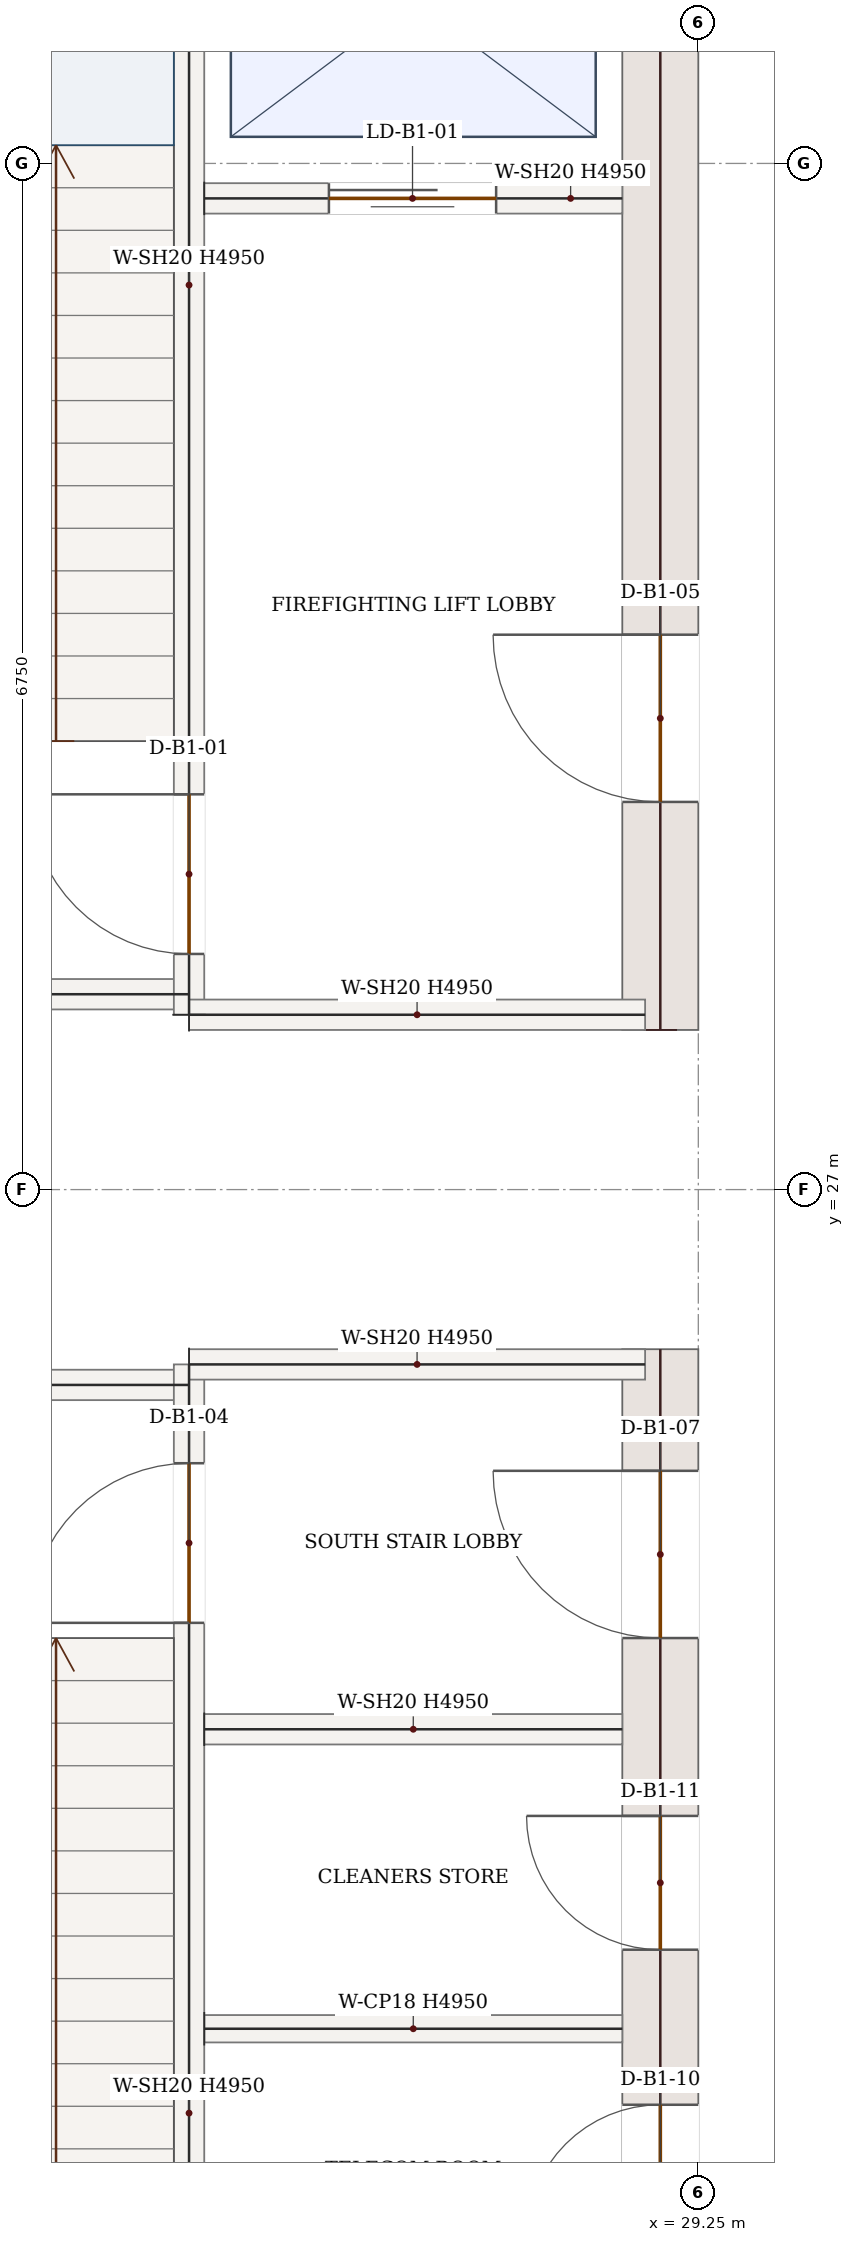
"""IFC4 building model, lengths in metres.
Left out: names, types, materials, properties, quantities, classifications, styles, units other than length and angle.
Written with IfcOpenShell. Run it as: python <this file> out.ifc"""

import sys

from ifc_helpers import new_model, si_unit, direction, frame, frame_2d, origin, place, context, subcontext, project, spatial, rectangle, extrude, source, transform, mapped, element, fill, save


model = new_model("IFC4")
c1 = context("Model", 3, precision=1e-05, world=origin(), true_north=direction((0.0, 1.0)))
c2 = subcontext(c1, "Body", "Model", "MODEL_VIEW")
j1 = project(units=[si_unit("LENGTHUNIT", "METRE"), si_unit("PLANEANGLEUNIT", "RADIAN")], contexts=[c1])
p1 = place(None, origin())
s1 = spatial("IfcSite", under=j1, at=p1, CompositionType="ELEMENT")
p2 = place(p1, origin())
s2 = spatial("IfcBuilding", under=s1, at=p2, CompositionType="ELEMENT")
p3 = place(p2, frame((0.0, 0.0, -5.4)))
s3 = spatial("IfcBuildingStorey", under=s2, at=p3, CompositionType="ELEMENT", Elevation=-5.4)
p4 = place(p3, frame((29.0, 17.4, 0.0), z_axis=(0.0, 0.0, 1.0), x_axis=(0.0, 1.0, 0.0)))
e1 = element("IfcWall", 1, at=p4, inside=s3, PredefinedType="SHEAR", context=c2, shape_type="SweptSolid", body=[
    extrude(rectangle(XDim=8.55, YDim=0.5, at=frame_2d((4.275, 0.0))), origin(), (0.0, 0.0, 1.0), 4.95),
])
p5 = place(p4, frame((6.65, 0.0, 0.0)))
e2 = element("IfcOpeningElement", 2, at=p5, cuts=e1, PredefinedType="OPENING", context=c2, shape_type="SweptSolid", body=[
    extrude(rectangle(XDim=1.1, YDim=2.2, at=frame_2d((0.55, 1.1))), frame((0.0, 0.26, 0.0), z_axis=(0.0, -1.0, 0.0), x_axis=(1.0, 0.0, 0.0)), (0.0, 0.0, 1.0), 0.52),
])
p6 = place(p4, frame((2.7, 0.0, 0.0)))
e3 = element("IfcOpeningElement", 3, at=p6, cuts=e1, PredefinedType="OPENING", context=c2, shape_type="SweptSolid", body=[
    extrude(rectangle(XDim=0.88, YDim=2.1, at=frame_2d((0.44, 1.05))), frame((0.0, 0.26, 0.0), z_axis=(0.0, -1.0, 0.0), x_axis=(1.0, 0.0, 0.0)), (0.0, 0.0, 1.0), 0.52),
])
p7 = place(p4, frame((4.6, 0.0, 0.0)))
e4 = element("IfcOpeningElement", 4, at=p7, cuts=e1, PredefinedType="OPENING", context=c2, shape_type="SweptSolid", body=[
    extrude(rectangle(XDim=0.88, YDim=2.1, at=frame_2d((0.44, 1.05))), frame((0.0, 0.26, 0.0), z_axis=(0.0, -1.0, 0.0), x_axis=(1.0, 0.0, 0.0)), (0.0, 0.0, 1.0), 0.52),
])
p8 = place(p3, frame((29.0, 28.05, 0.0), z_axis=(0.0, 0.0, 1.0), x_axis=(0.0, 1.0, 0.0)))
e5 = element("IfcWall", 5, at=p8, inside=s3, PredefinedType="SHEAR", context=c2, shape_type="SweptSolid", body=[
    extrude(rectangle(XDim=8.55, YDim=0.5, at=frame_2d((4.275, 0.0))), origin(), (0.0, 0.0, 1.0), 4.95),
])
p9 = place(p8, frame((1.5, 0.0, 0.0)))
e6 = element("IfcOpeningElement", 6, at=p9, cuts=e5, PredefinedType="OPENING", context=c2, shape_type="SweptSolid", body=[
    extrude(rectangle(XDim=1.1, YDim=2.2, at=frame_2d((0.55, 1.1))), frame((0.0, 0.26, 0.0), z_axis=(0.0, -1.0, 0.0), x_axis=(1.0, 0.0, 0.0)), (0.0, 0.0, 1.0), 0.52),
])
p10 = place(p3, frame((25.9, 17.85, 0.0), z_axis=(0.0, 0.0, 1.0), x_axis=(0.0, 1.0, 0.0)))
e7 = element("IfcWall", 7, at=p10, inside=s3, PredefinedType="SOLIDWALL", context=c2, shape_type="SweptSolid", body=[
    extrude(rectangle(XDim=8.0, YDim=0.2, at=frame_2d((4.0, 0.0))), origin(), (0.0, 0.0, 1.0), 4.95),
])
p11 = place(p10, frame((6.3, 0.0, 0.0)))
e8 = element("IfcOpeningElement", 8, at=p11, cuts=e7, PredefinedType="OPENING", context=c2, shape_type="SweptSolid", body=[
    extrude(rectangle(XDim=1.05, YDim=2.15, at=frame_2d((0.525, 1.075))), frame((0.0, 0.11, 0.0), z_axis=(0.0, -1.0, 0.0), x_axis=(1.0, 0.0, 0.0)), (0.0, 0.0, 1.0), 0.22),
])
p12 = place(p3, frame((25.9, 28.15, 0.0), z_axis=(0.0, 0.0, 1.0), x_axis=(0.0, 1.0, 0.0)))
e9 = element("IfcWall", 9, at=p12, inside=s3, PredefinedType="SOLIDWALL", context=c2, shape_type="SweptSolid", body=[
    extrude(rectangle(XDim=8.0, YDim=0.2, at=frame_2d((4.0, 0.0))), origin(), (0.0, 0.0, 1.0), 4.95),
])
p13 = place(p12, frame((0.4, 0.0, 0.0)))
e10 = element("IfcOpeningElement", 10, at=p13, cuts=e9, PredefinedType="OPENING", context=c2, shape_type="SweptSolid", body=[
    extrude(rectangle(XDim=1.05, YDim=2.15, at=frame_2d((0.525, 1.075))), frame((0.0, 0.11, 0.0), z_axis=(0.0, -1.0, 0.0), x_axis=(1.0, 0.0, 0.0)), (0.0, 0.0, 1.0), 0.22),
])
m1 = source(origin(), c2, "Body", "SweptSolid", [
    extrude(rectangle(XDim=4.25, YDim=0.2, at=frame_2d((2.125, 0.0))), origin(), (0.0, 0.0, 1.0), 4.95),
])
p14 = place(p3, frame((21.65, 25.715, 0.0), z_axis=(0.0, 0.0, 1.0), x_axis=(1.0, 0.0, 0.0)))
e11 = element("IfcWall", 11, at=p14, inside=s3, PredefinedType="SOLIDWALL", context=c2, shape_type="MappedRepresentation", body=[
    mapped(m1, transform((0.0, 0.0, 0.0), x_axis=(1.0, 0.0, 0.0), y_axis=(0.0, 1.0, 0.0), z_axis=(0.0, 0.0, 1.0), scale=1.0)),
])
m2 = source(origin(), c2, "Body", "SweptSolid", [
    extrude(rectangle(XDim=3.0, YDim=0.2, at=frame_2d((1.5, 0.0))), origin(), (0.0, 0.0, 1.0), 4.95),
])
p15 = place(p3, frame((25.9, 25.85, 0.0), z_axis=(0.0, 0.0, 1.0), x_axis=(1.0, 0.0, 0.0)))
e12 = element("IfcWall", 12, at=p15, inside=s3, PredefinedType="SOLIDWALL", context=c2, shape_type="MappedRepresentation", body=[
    mapped(m2, transform((0.0, 0.0, 0.0), x_axis=(1.0, 0.0, 0.0), y_axis=(0.0, 1.0, 0.0), z_axis=(0.0, 0.0, 1.0), scale=1.0)),
])
p16 = place(p3, frame((21.65, 28.285, 0.0), z_axis=(0.0, 0.0, 1.0), x_axis=(1.0, 0.0, 0.0)))
e13 = element("IfcWall", 13, at=p16, inside=s3, PredefinedType="SOLIDWALL", context=c2, shape_type="MappedRepresentation", body=[
    mapped(m1, transform((0.0, 0.0, 0.0), x_axis=(1.0, 0.0, 0.0), y_axis=(0.0, 1.0, 0.0), z_axis=(0.0, 0.0, 1.0), scale=1.0)),
])
p17 = place(p3, frame((25.9, 28.15, 0.0), z_axis=(0.0, 0.0, 1.0), x_axis=(1.0, 0.0, 0.0)))
e14 = element("IfcWall", 14, at=p17, inside=s3, PredefinedType="SOLIDWALL", context=c2, shape_type="MappedRepresentation", body=[
    mapped(m2, transform((0.0, 0.0, 0.0), x_axis=(1.0, 0.0, 0.0), y_axis=(0.0, 1.0, 0.0), z_axis=(0.0, 0.0, 1.0), scale=1.0)),
])
p18 = place(p3, frame((26.0, 33.52, 0.0), z_axis=(0.0, 0.0, 1.0), x_axis=(1.0, 0.0, 0.0)))
e15 = element("IfcWall", 15, at=p18, inside=s3, PredefinedType="SOLIDWALL", context=c2, shape_type="SweptSolid", body=[
    extrude(rectangle(XDim=2.75, YDim=0.2, at=frame_2d((1.375, 0.0))), origin(), (0.0, 0.0, 1.0), 4.95),
])
p19 = place(p18, frame((0.82, 0.0, 0.0)))
e16 = element("IfcOpeningElement", 16, at=p19, cuts=e15, PredefinedType="OPENING", context=c2, shape_type="SweptSolid", body=[
    extrude(rectangle(XDim=1.1, YDim=2.15, at=frame_2d((0.55, 1.075))), frame((0.0, 0.11, 0.0), z_axis=(0.0, -1.0, 0.0), x_axis=(1.0, 0.0, 0.0)), (0.0, 0.0, 1.0), 0.22),
])
m3 = source(origin(), c2, "Body", "SweptSolid", [
    extrude(rectangle(XDim=2.75, YDim=0.2, at=frame_2d((1.375, 0.0))), origin(), (0.0, 0.0, 1.0), 4.95),
])
p20 = place(p3, frame((26.0, 23.45, 0.0), z_axis=(0.0, 0.0, 1.0), x_axis=(1.0, 0.0, 0.0)))
e17 = element("IfcWall", 17, at=p20, inside=s3, PredefinedType="SOLIDWALL", context=c2, shape_type="MappedRepresentation", body=[
    mapped(m3, transform((0.0, 0.0, 0.0), x_axis=(1.0, 0.0, 0.0), y_axis=(0.0, 1.0, 0.0), z_axis=(0.0, 0.0, 1.0), scale=1.0)),
])
m4 = source(origin(), c2, "Body", "SweptSolid", [
    extrude(rectangle(XDim=2.75, YDim=0.18, at=frame_2d((1.375, 0.0))), origin(), (0.0, 0.0, 1.0), 4.95),
])
p21 = place(p3, frame((26.0, 21.48, 0.0), z_axis=(0.0, 0.0, 1.0), x_axis=(1.0, 0.0, 0.0)))
e18 = element("IfcWall", 18, at=p21, inside=s3, PredefinedType="PARTITIONING", context=c2, shape_type="MappedRepresentation", body=[
    mapped(m4, transform((0.0, 0.0, 0.0), x_axis=(1.0, 0.0, 0.0), y_axis=(0.0, 1.0, 0.0), z_axis=(0.0, 0.0, 1.0), scale=1.0)),
])
m5 = source(origin(), c2, "Body", "SweptSolid", [
    extrude(rectangle(XDim=1.05, YDim=2.15, at=frame_2d((0.525, 1.075))), frame((0.0, 0.025, 0.0), z_axis=(0.0, -1.0, 0.0), x_axis=(1.0, 0.0, 0.0)), (0.0, 0.0, 1.0), 0.05),
])
p22 = place(p13, origin())
e19 = element("IfcDoor", 19, at=p22, inside=s3, OperationType="SINGLE_SWING_RIGHT", PredefinedType="DOOR", context=c2, shape_type="MappedRepresentation", body=[
    mapped(m5, transform((0.0, 0.0, 0.0), x_axis=(1.0, 0.0, 0.0), y_axis=(0.0, 1.0, 0.0), z_axis=(0.0, 0.0, 1.0), scale=1.0)),
])
fill(e10, e19)
p23 = place(p11, origin())
e20 = element("IfcDoor", 20, at=p23, inside=s3, OperationType="SINGLE_SWING_LEFT", PredefinedType="DOOR", context=c2, shape_type="MappedRepresentation", body=[
    mapped(m5, transform((0.0, 0.0, 0.0), x_axis=(1.0, 0.0, 0.0), y_axis=(0.0, 1.0, 0.0), z_axis=(0.0, 0.0, 1.0), scale=1.0)),
])
fill(e8, e20)
m6 = source(origin(), c2, "Body", "SweptSolid", [
    extrude(rectangle(XDim=1.1, YDim=2.15, at=frame_2d((0.55, 1.075))), frame((0.0, 0.025, 0.0), z_axis=(0.0, -1.0, 0.0), x_axis=(1.0, 0.0, 0.0)), (0.0, 0.0, 1.0), 0.05),
])
p24 = place(p19, origin())
e21 = element("IfcDoor", 21, at=p24, inside=s3, OperationType="DOUBLE_DOOR_SLIDING", PredefinedType="DOOR", context=c2, shape_type="MappedRepresentation", body=[
    mapped(m6, transform((0.0, 0.0, 0.0), x_axis=(1.0, 0.0, 0.0), y_axis=(0.0, 1.0, 0.0), z_axis=(0.0, 0.0, 1.0), scale=1.0)),
])
fill(e16, e21)
m7 = source(origin(), c2, "Body", "SweptSolid", [
    extrude(rectangle(XDim=1.1, YDim=2.2, at=frame_2d((0.55, 1.1))), frame((0.0, 0.025, 0.0), z_axis=(0.0, -1.0, 0.0), x_axis=(1.0, 0.0, 0.0)), (0.0, 0.0, 1.0), 0.05),
])
p25 = place(p9, origin())
e22 = element("IfcDoor", 22, at=p25, inside=s3, OperationType="SINGLE_SWING_RIGHT", PredefinedType="DOOR", context=c2, shape_type="MappedRepresentation", body=[
    mapped(m7, transform((0.0, 0.0, 0.0), x_axis=(1.0, 0.0, 0.0), y_axis=(0.0, 1.0, 0.0), z_axis=(0.0, 0.0, 1.0), scale=1.0)),
])
fill(e6, e22)
p26 = place(p5, origin())
e23 = element("IfcDoor", 23, at=p26, inside=s3, OperationType="SINGLE_SWING_RIGHT", PredefinedType="DOOR", context=c2, shape_type="MappedRepresentation", body=[
    mapped(m7, transform((0.0, 0.0, 0.0), x_axis=(1.0, 0.0, 0.0), y_axis=(0.0, 1.0, 0.0), z_axis=(0.0, 0.0, 1.0), scale=1.0)),
])
fill(e2, e23)
m8 = source(origin(), c2, "Body", "SweptSolid", [
    extrude(rectangle(XDim=0.88, YDim=2.1, at=frame_2d((0.44, 1.05))), frame((0.0, 0.025, 0.0), z_axis=(0.0, -1.0, 0.0), x_axis=(1.0, 0.0, 0.0)), (0.0, 0.0, 1.0), 0.05),
])
p27 = place(p6, origin())
e24 = element("IfcDoor", 24, at=p27, inside=s3, OperationType="SINGLE_SWING_LEFT", PredefinedType="DOOR", context=c2, shape_type="MappedRepresentation", body=[
    mapped(m8, transform((0.0, 0.0, 0.0), x_axis=(1.0, 0.0, 0.0), y_axis=(0.0, 1.0, 0.0), z_axis=(0.0, 0.0, 1.0), scale=1.0)),
])
fill(e3, e24)
p28 = place(p7, origin())
e25 = element("IfcDoor", 25, at=p28, inside=s3, OperationType="SINGLE_SWING_RIGHT", PredefinedType="DOOR", context=c2, shape_type="MappedRepresentation", body=[
    mapped(m8, transform((0.0, 0.0, 0.0), x_axis=(1.0, 0.0, 0.0), y_axis=(0.0, 1.0, 0.0), z_axis=(0.0, 0.0, 1.0), scale=1.0)),
])
fill(e4, e25)
save(model, sys.argv[1])
